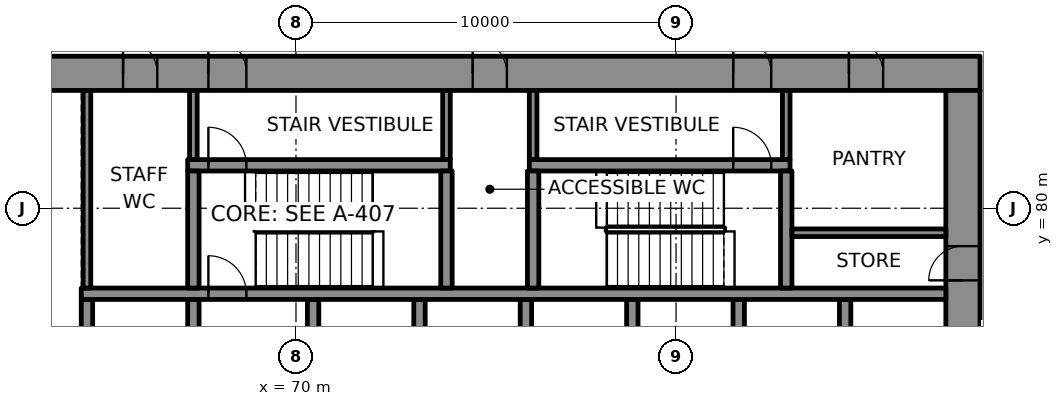
"""IFC4 building model, lengths in metres.
Left out: names, types, materials, properties, quantities, classifications, styles, units other than length and angle.
Written with IfcOpenShell. Run it as: python <this file> out.ifc"""

import sys

from ifc_helpers import new_model, si_unit, direction, frame, frame_2d, origin, place, context, subcontext, project, spatial, rectangle, extrude, element, fill, save


model = new_model("IFC4")
c1 = context("Model", 3, precision=1e-05, world=origin(), true_north=direction((0.0, 1.0)))
c2 = subcontext(c1, "Body", "Model", "MODEL_VIEW")
j1 = project(units=[si_unit("LENGTHUNIT", "METRE"), si_unit("PLANEANGLEUNIT", "RADIAN")], contexts=[c1])
p1 = place(None, origin())
s1 = spatial("IfcSite", under=j1, at=p1, CompositionType="ELEMENT")
p2 = place(p1, origin())
s2 = spatial("IfcBuilding", under=s1, at=p2, CompositionType="ELEMENT")
p3 = place(p2, frame((0.0, 0.0, 107.2)))
s3 = spatial("IfcBuildingStorey", under=s2, at=p3, CompositionType="ELEMENT", Elevation=107.2)
p4 = place(p3, frame((62.9, 83.55, 0.0), z_axis=(0.0, 0.0, 1.0), x_axis=(1.0, 0.0, 0.0)))
e1 = element("IfcWall", 1, at=p4, inside=s3, PredefinedType="SHEAR", context=c2, shape_type="SweptSolid", body=[
    extrude(rectangle(XDim=25.1, YDim=0.9, at=frame_2d((12.55, 0.0))), origin(), (0.0, 0.0, 1.0), 4.0),
])
p5 = place(p4, frame((4.795, 0.0, 0.0)))
e2 = element("IfcOpeningElement", 2, at=p5, cuts=e1, PredefinedType="OPENING", context=c2, shape_type="SweptSolid", body=[
    extrude(rectangle(XDim=1.0, YDim=2.1, at=frame_2d((0.5, 1.05))), frame((0.0, 0.46, 0.0), z_axis=(0.0, -1.0, 0.0), x_axis=(1.0, 0.0, 0.0)), (0.0, 0.0, 1.0), 0.92),
])
p6 = place(p4, frame((18.605, 0.0, 0.0)))
e3 = element("IfcOpeningElement", 3, at=p6, cuts=e1, PredefinedType="OPENING", context=c2, shape_type="SweptSolid", body=[
    extrude(rectangle(XDim=1.0, YDim=2.1, at=frame_2d((0.5, 1.05))), frame((0.0, 0.46, 0.0), z_axis=(0.0, -1.0, 0.0), x_axis=(1.0, 0.0, 0.0)), (0.0, 0.0, 1.0), 0.92),
])
p7 = place(p4, frame((2.55, 0.0, 0.0)))
e4 = element("IfcOpeningElement", 4, at=p7, cuts=e1, PredefinedType="OPENING", context=c2, shape_type="SweptSolid", body=[
    extrude(rectangle(XDim=0.9, YDim=2.1, at=frame_2d((0.45, 1.05))), frame((0.0, 0.46, 0.0), z_axis=(0.0, -1.0, 0.0), x_axis=(1.0, 0.0, 0.0)), (0.0, 0.0, 1.0), 0.92),
])
p8 = place(p4, frame((11.75, 0.0, 0.0)))
e5 = element("IfcOpeningElement", 5, at=p8, cuts=e1, PredefinedType="OPENING", context=c2, shape_type="SweptSolid", body=[
    extrude(rectangle(XDim=0.9, YDim=2.1, at=frame_2d((0.45, 1.05))), frame((0.0, 0.46, 0.0), z_axis=(0.0, -1.0, 0.0), x_axis=(1.0, 0.0, 0.0)), (0.0, 0.0, 1.0), 0.92),
])
p9 = place(p4, frame((21.65, 0.0, 0.0)))
e6 = element("IfcOpeningElement", 6, at=p9, cuts=e1, PredefinedType="OPENING", context=c2, shape_type="SweptSolid", body=[
    extrude(rectangle(XDim=0.9, YDim=2.1, at=frame_2d((0.45, 1.05))), frame((0.0, 0.46, 0.0), z_axis=(0.0, -1.0, 0.0), x_axis=(1.0, 0.0, 0.0)), (0.0, 0.0, 1.0), 0.92),
])
p10 = place(p3, frame((87.55, 66.9, 0.0), z_axis=(0.0, 0.0, 1.0), x_axis=(0.0, 1.0, 0.0)))
e7 = element("IfcWall", 7, at=p10, inside=s3, PredefinedType="SHEAR", context=c2, shape_type="SweptSolid", body=[
    extrude(rectangle(XDim=16.2, YDim=0.9, at=frame_2d((8.1, 0.0))), origin(), (0.0, 0.0, 1.0), 4.0),
])
p11 = place(p10, frame((5.5, 0.0, 0.0)))
e8 = element("IfcOpeningElement", 8, at=p11, cuts=e7, PredefinedType="OPENING", context=c2, shape_type="SweptSolid", body=[
    extrude(rectangle(XDim=1.8, YDim=2.1, at=frame_2d((0.9, 1.05))), frame((0.0, 0.46, 0.0), z_axis=(0.0, -1.0, 0.0), x_axis=(1.0, 0.0, 0.0)), (0.0, 0.0, 1.0), 0.92),
])
p12 = place(p10, frame((11.202, 0.0, 0.0)))
e9 = element("IfcOpeningElement", 9, at=p12, cuts=e7, PredefinedType="OPENING", context=c2, shape_type="SweptSolid", body=[
    extrude(rectangle(XDim=0.9, YDim=2.1, at=frame_2d((0.45, 1.05))), frame((0.0, 0.46, 0.0), z_axis=(0.0, -1.0, 0.0), x_axis=(1.0, 0.0, 0.0)), (0.0, 0.0, 1.0), 0.92),
])
for number, where, z_axis, x_axis in (
    (10, (64.5, 75.0, 0.0), (0.0, 0.0, 1.0), (0.0, 1.0, 0.0)),
    (11, (67.3, 75.0, 0.0), (0.0, 0.0, 1.0), (0.0, 1.0, 0.0)),
):
    element("IfcWall", number, at=place(p3, frame(where, z_axis=z_axis, x_axis=x_axis)), inside=s3, PredefinedType="SHEAR", context=c2, shape_type="SweptSolid", body=[
        extrude(rectangle(XDim=2.6, YDim=0.3, at=frame_2d((1.3, 0.0))), origin(), (0.0, 0.0, 1.0), 4.0),
    ])
p13 = place(p3, frame((70.45, 75.0, 0.0), z_axis=(0.0, 0.0, 1.0), x_axis=(0.0, 1.0, 0.0)))
e12 = element("IfcWall", 12, at=p13, inside=s3, PredefinedType="SHEAR", context=c2, shape_type="SweptSolid", body=[
    extrude(rectangle(XDim=2.6, YDim=0.3, at=frame_2d((1.3, 0.0))), origin(), (0.0, 0.0, 1.0), 4.0),
])
p14 = place(p13, frame((0.15, 0.0, 0.0)))
e13 = element("IfcOpeningElement", 13, at=p14, cuts=e12, PredefinedType="OPENING", context=c2, shape_type="SweptSolid", body=[
    extrude(rectangle(XDim=1.1, YDim=2.1, at=frame_2d((0.55, 1.05))), frame((0.0, 0.16, 0.0), z_axis=(0.0, -1.0, 0.0), x_axis=(1.0, 0.0, 0.0)), (0.0, 0.0, 1.0), 0.32),
])
for number, where, z_axis, x_axis in (
    (14, (73.25, 75.0, 0.0), (0.0, 0.0, 1.0), (0.0, 1.0, 0.0)),
    (15, (76.05, 75.0, 0.0), (0.0, 0.0, 1.0), (0.0, 1.0, 0.0)),
    (16, (78.85, 75.0, 0.0), (0.0, 0.0, 1.0), (0.0, 1.0, 0.0)),
    (17, (81.65, 75.0, 0.0), (0.0, 0.0, 1.0), (0.0, 1.0, 0.0)),
    (18, (84.45, 75.0, 0.0), (0.0, 0.0, 1.0), (0.0, 1.0, 0.0)),
):
    element("IfcWall", number, at=place(p3, frame(where, z_axis=z_axis, x_axis=x_axis)), inside=s3, PredefinedType="SHEAR", context=c2, shape_type="SweptSolid", body=[
        extrude(rectangle(XDim=2.6, YDim=0.3, at=frame_2d((1.3, 0.0))), origin(), (0.0, 0.0, 1.0), 4.0),
    ])
p15 = place(p3, frame((64.35, 77.75, 0.0), z_axis=(0.0, 0.0, 1.0), x_axis=(1.0, 0.0, 0.0)))
e19 = element("IfcWall", 19, at=p15, inside=s3, PredefinedType="SHEAR", context=c2, shape_type="SweptSolid", body=[
    extrude(rectangle(XDim=22.75, YDim=0.3, at=frame_2d((11.375, 0.0))), origin(), (0.0, 0.0, 1.0), 4.0),
])
p16 = place(p15, frame((3.345, 0.0, 0.0)))
e20 = element("IfcOpeningElement", 20, at=p16, cuts=e19, PredefinedType="OPENING", context=c2, shape_type="SweptSolid", body=[
    extrude(rectangle(XDim=1.0, YDim=2.1, at=frame_2d((0.5, 1.05))), frame((0.0, 0.16, 0.0), z_axis=(0.0, -1.0, 0.0), x_axis=(1.0, 0.0, 0.0)), (0.0, 0.0, 1.0), 0.32),
])
p17 = place(p3, frame((67.15, 81.13, 0.0), z_axis=(0.0, 0.0, 1.0), x_axis=(1.0, 0.0, 0.0)))
e21 = element("IfcWall", 21, at=p17, inside=s3, PredefinedType="SHEAR", context=c2, shape_type="SweptSolid", body=[
    extrude(rectangle(XDim=6.91, YDim=0.3, at=frame_2d((3.455, 0.0))), origin(), (0.0, 0.0, 1.0), 4.0),
])
p18 = place(p17, frame((0.545, 0.0, 0.0)))
e22 = element("IfcOpeningElement", 22, at=p18, cuts=e21, PredefinedType="OPENING", context=c2, shape_type="SweptSolid", body=[
    extrude(rectangle(XDim=1.0, YDim=2.1, at=frame_2d((0.5, 1.05))), frame((0.0, 0.16, 0.0), z_axis=(0.0, -1.0, 0.0), x_axis=(1.0, 0.0, 0.0)), (0.0, 0.0, 1.0), 0.32),
])
p19 = place(p3, frame((76.14, 81.13, 0.0), z_axis=(0.0, 0.0, 1.0), x_axis=(1.0, 0.0, 0.0)))
e23 = element("IfcWall", 23, at=p19, inside=s3, PredefinedType="SHEAR", context=c2, shape_type="SweptSolid", body=[
    extrude(rectangle(XDim=6.86, YDim=0.3, at=frame_2d((3.43, 0.0))), origin(), (0.0, 0.0, 1.0), 4.0),
])
p20 = place(p19, frame((5.365, 0.0, 0.0)))
e24 = element("IfcOpeningElement", 24, at=p20, cuts=e23, PredefinedType="OPENING", context=c2, shape_type="SweptSolid", body=[
    extrude(rectangle(XDim=1.0, YDim=2.1, at=frame_2d((0.5, 1.05))), frame((0.0, 0.16, 0.0), z_axis=(0.0, -1.0, 0.0), x_axis=(1.0, 0.0, 0.0)), (0.0, 0.0, 1.0), 0.32),
])
for number, where, z_axis, x_axis in (
    (25, (67.3, 77.9, 0.0), (0.0, 0.0, 1.0), (0.0, 1.0, 0.0)),
    (26, (73.96, 77.9, 0.0), (0.0, 0.0, 1.0), (0.0, 1.0, 0.0)),
    (27, (76.24, 77.9, 0.0), (0.0, 0.0, 1.0), (0.0, 1.0, 0.0)),
    (28, (82.9, 77.9, 0.0), (0.0, 0.0, 1.0), (0.0, 1.0, 0.0)),
):
    element("IfcWall", number, at=place(p3, frame(where, z_axis=z_axis, x_axis=x_axis)), inside=s3, PredefinedType="SHEAR", context=c2, shape_type="SweptSolid", body=[
        extrude(rectangle(XDim=3.08, YDim=0.3, at=frame_2d((1.54, 0.0))), origin(), (0.0, 0.0, 1.0), 4.0),
    ])
p21 = place(p3, frame((83.05, 79.355, 0.0), z_axis=(0.0, 0.0, 1.0), x_axis=(1.0, 0.0, 0.0)))
e29 = element("IfcWall", 29, at=p21, inside=s3, PredefinedType="PARTITIONING", context=c2, shape_type="SweptSolid", body=[
    extrude(rectangle(XDim=4.05, YDim=0.2, at=frame_2d((2.025, 0.0))), origin(), (0.0, 0.0, 1.0), 4.0),
])
p22 = place(p3, frame((64.5, 77.9, 0.0), z_axis=(0.0, 0.0, 1.0), x_axis=(0.0, 1.0, 0.0)))
e30 = element("IfcWall", 30, at=p22, inside=s3, PredefinedType="PARTITIONING", context=c2, shape_type="SweptSolid", body=[
    extrude(rectangle(XDim=5.2, YDim=0.2, at=frame_2d((2.6, 0.0))), origin(), (0.0, 0.0, 1.0), 4.0),
])
for number, where, z_axis, x_axis in (
    (31, (67.3, 81.28, 0.0), (0.0, 0.0, 1.0), (0.0, 1.0, 0.0)),
    (32, (73.96, 81.28, 0.0), (0.0, 0.0, 1.0), (0.0, 1.0, 0.0)),
    (33, (76.24, 81.28, 0.0), (0.0, 0.0, 1.0), (0.0, 1.0, 0.0)),
    (34, (82.9, 81.28, 0.0), (0.0, 0.0, 1.0), (0.0, 1.0, 0.0)),
):
    element("IfcWall", number, at=place(p3, frame(where, z_axis=z_axis, x_axis=x_axis)), inside=s3, PredefinedType="PARTITIONING", context=c2, shape_type="SweptSolid", body=[
        extrude(rectangle(XDim=1.82, YDim=0.2, at=frame_2d((0.91, 0.0))), origin(), (0.0, 0.0, 1.0), 4.0),
    ])
p23 = place(p16, origin())
e35 = element("IfcDoor", 35, at=p23, inside=s3, OperationType="SINGLE_SWING_LEFT", PredefinedType="DOOR", context=c2, shape_type="SweptSolid", body=[
    extrude(rectangle(XDim=1.0, YDim=2.1, at=frame_2d((0.5, 1.05))), frame((0.0, 0.025, 0.0), z_axis=(0.0, -1.0, 0.0), x_axis=(1.0, 0.0, 0.0)), (0.0, 0.0, 1.0), 0.05),
])
fill(e20, e35)
p24 = place(p18, origin())
e36 = element("IfcDoor", 36, at=p24, inside=s3, OperationType="SINGLE_SWING_RIGHT", PredefinedType="DOOR", context=c2, shape_type="SweptSolid", body=[
    extrude(rectangle(XDim=1.0, YDim=2.1, at=frame_2d((0.5, 1.05))), frame((0.0, 0.025, 0.0), z_axis=(0.0, -1.0, 0.0), x_axis=(1.0, 0.0, 0.0)), (0.0, 0.0, 1.0), 0.05),
])
fill(e22, e36)
p25 = place(p5, origin())
e37 = element("IfcDoor", 37, at=p25, inside=s3, OperationType="SINGLE_SWING_LEFT", PredefinedType="DOOR", context=c2, shape_type="SweptSolid", body=[
    extrude(rectangle(XDim=1.0, YDim=2.1, at=frame_2d((0.5, 1.05))), frame((0.0, 0.17, 0.0), z_axis=(0.0, -1.0, 0.0), x_axis=(1.0, 0.0, 0.0)), (0.0, 0.0, 1.0), 0.34),
])
fill(e2, e37)
p26 = place(p20, origin())
e38 = element("IfcDoor", 38, at=p26, inside=s3, OperationType="SINGLE_SWING_RIGHT", PredefinedType="DOOR", context=c2, shape_type="SweptSolid", body=[
    extrude(rectangle(XDim=1.0, YDim=2.1, at=frame_2d((0.5, 1.05))), frame((0.0, 0.025, 0.0), z_axis=(0.0, -1.0, 0.0), x_axis=(1.0, 0.0, 0.0)), (0.0, 0.0, 1.0), 0.05),
])
fill(e24, e38)
p27 = place(p6, origin())
e39 = element("IfcDoor", 39, at=p27, inside=s3, OperationType="SINGLE_SWING_LEFT", PredefinedType="DOOR", context=c2, shape_type="SweptSolid", body=[
    extrude(rectangle(XDim=1.0, YDim=2.1, at=frame_2d((0.5, 1.05))), frame((0.0, 0.17, 0.0), z_axis=(0.0, -1.0, 0.0), x_axis=(1.0, 0.0, 0.0)), (0.0, 0.0, 1.0), 0.34),
])
fill(e3, e39)
p28 = place(p7, origin())
e40 = element("IfcDoor", 40, at=p28, inside=s3, OperationType="SINGLE_SWING_RIGHT", PredefinedType="DOOR", context=c2, shape_type="SweptSolid", body=[
    extrude(rectangle(XDim=0.9, YDim=2.1, at=frame_2d((0.45, 1.05))), frame((0.0, 0.17, 0.0), z_axis=(0.0, -1.0, 0.0), x_axis=(1.0, 0.0, 0.0)), (0.0, 0.0, 1.0), 0.34),
])
fill(e4, e40)
p29 = place(p8, origin())
e41 = element("IfcDoor", 41, at=p29, inside=s3, OperationType="SINGLE_SWING_LEFT", PredefinedType="DOOR", context=c2, shape_type="SweptSolid", body=[
    extrude(rectangle(XDim=0.9, YDim=2.1, at=frame_2d((0.45, 1.05))), frame((0.0, 0.17, 0.0), z_axis=(0.0, -1.0, 0.0), x_axis=(1.0, 0.0, 0.0)), (0.0, 0.0, 1.0), 0.34),
])
fill(e5, e41)
p30 = place(p12, origin())
e42 = element("IfcDoor", 42, at=p30, inside=s3, OperationType="SINGLE_SWING_RIGHT", PredefinedType="DOOR", context=c2, shape_type="SweptSolid", body=[
    extrude(rectangle(XDim=0.9, YDim=2.1, at=frame_2d((0.45, 1.05))), frame((0.0, 0.17, 0.0), z_axis=(0.0, -1.0, 0.0), x_axis=(1.0, 0.0, 0.0)), (0.0, 0.0, 1.0), 0.34),
])
fill(e9, e42)
p31 = place(p9, origin())
e43 = element("IfcDoor", 43, at=p31, inside=s3, OperationType="SINGLE_SWING_LEFT", PredefinedType="DOOR", context=c2, shape_type="SweptSolid", body=[
    extrude(rectangle(XDim=0.9, YDim=2.1, at=frame_2d((0.45, 1.05))), frame((0.0, 0.17, 0.0), z_axis=(0.0, -1.0, 0.0), x_axis=(1.0, 0.0, 0.0)), (0.0, 0.0, 1.0), 0.34),
])
fill(e6, e43)
save(model, sys.argv[1])
